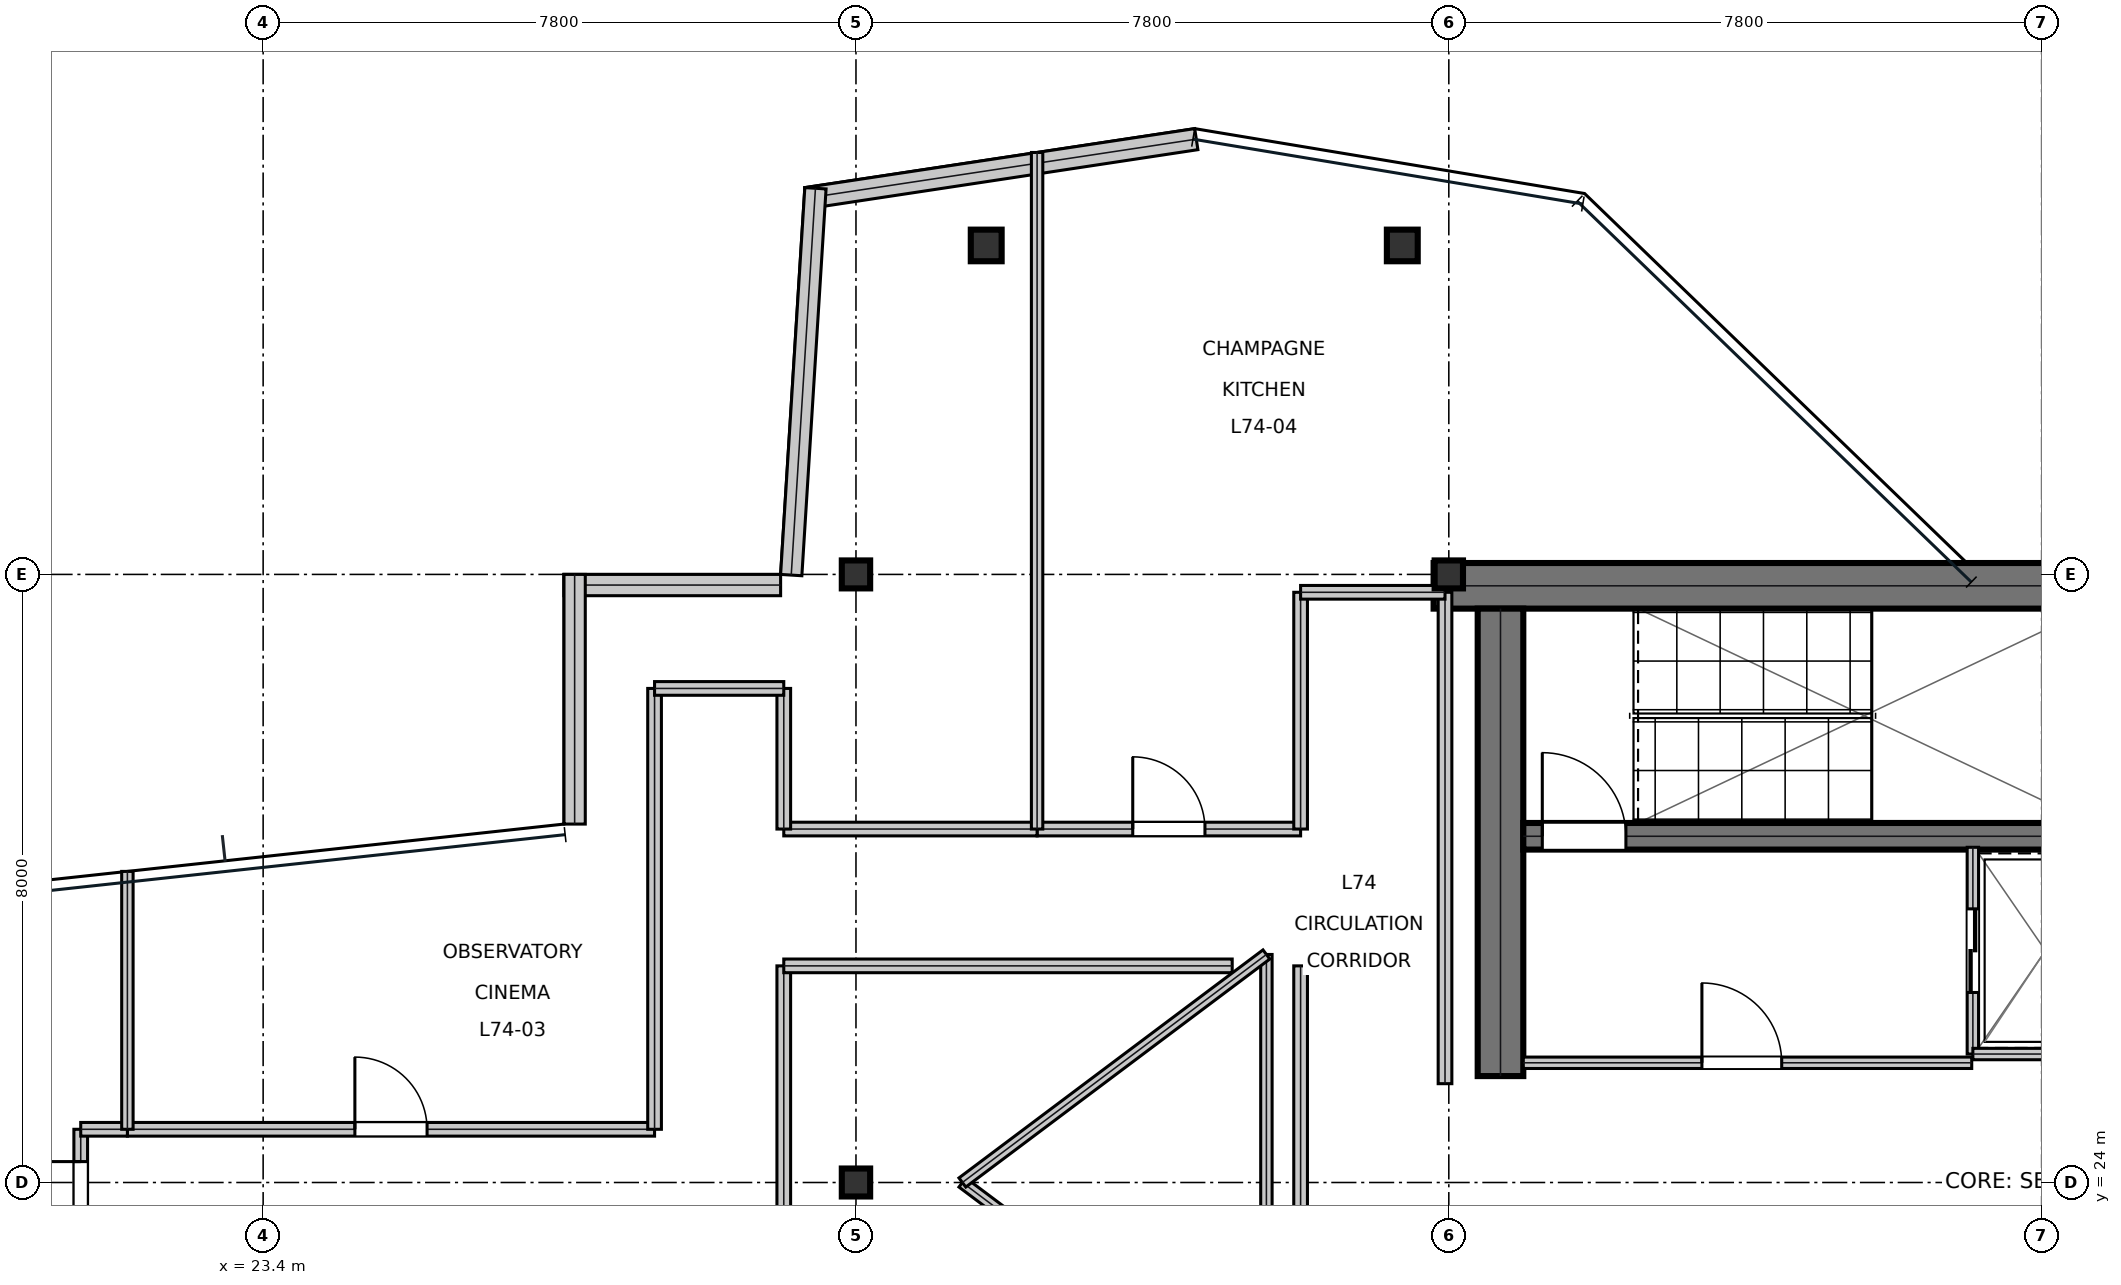
"""IFC4 building model, lengths in metres.
Left out: names, types, materials, properties, quantities, classifications, styles, units other than length and angle.
Written with IfcOpenShell. Run it as: python <this file> out.ifc"""

import sys

from ifc_helpers import new_model, si_unit, direction, frame, frame_2d, origin, origin_2d, place, context, subcontext, project, spatial, rectangle, i_section, extrude, element, fill, save


model = new_model("IFC4")
c1 = context("Model", 3, precision=1e-05, world=origin(), true_north=direction((0.0, 1.0)))
c2 = subcontext(c1, "Body", "Model", "MODEL_VIEW")
j1 = project(units=[si_unit("LENGTHUNIT", "METRE"), si_unit("PLANEANGLEUNIT", "RADIAN")], contexts=[c1])
p1 = place(None, origin())
s1 = spatial("IfcSite", under=j1, at=p1, CompositionType="ELEMENT")
p2 = place(p1, origin())
s2 = spatial("IfcBuilding", under=s1, at=p2, CompositionType="ELEMENT")
p3 = place(p2, frame((0.0, 0.0, 315.45)))
s3 = spatial("IfcBuildingStorey", under=s2, at=p3, CompositionType="ELEMENT", Elevation=315.45)
p4 = place(p3, frame((38.8, 31.85, 0.0), z_axis=(0.0, 0.0, 1.0), x_axis=(1.0, 0.0, 0.0)))
e1 = element("IfcWall", 1, at=p4, inside=s3, PredefinedType="SHEAR", context=c2, shape_type="SweptSolid", body=[
    extrude(rectangle(XDim=16.0, YDim=0.6, at=frame_2d((8.0, 0.0))), origin(), (0.0, 0.0, 1.0), 3.78),
])
p5 = place(p3, frame((39.68, 25.4, 0.0), z_axis=(0.0, 0.0, 1.0), x_axis=(0.0, 1.0, 0.0)))
e2 = element("IfcWall", 2, at=p5, inside=s3, PredefinedType="SHEAR", context=c2, shape_type="SweptSolid", body=[
    extrude(rectangle(XDim=6.15, YDim=0.6, at=frame_2d((3.075, 0.0))), origin(), (0.0, 0.0, 1.0), 3.78),
])
p6 = place(p3, frame((39.98, 28.555, 0.0), z_axis=(0.0, 0.0, 1.0), x_axis=(1.0, 0.0, 0.0)))
e3 = element("IfcWall", 3, at=p6, inside=s3, PredefinedType="SHEAR", context=c2, shape_type="SweptSolid", body=[
    extrude(rectangle(XDim=7.71, YDim=0.35, at=frame_2d((3.855, 0.0))), origin(), (0.0, 0.0, 1.0), 3.78),
])
p7 = place(p6, frame((0.25, 0.0, 0.0)))
e4 = element("IfcOpeningElement", 4, at=p7, cuts=e3, PredefinedType="OPENING", context=c2, shape_type="SweptSolid", body=[
    extrude(rectangle(XDim=1.1, YDim=2.15, at=frame_2d((0.55, 1.075))), frame((0.0, 0.185, 0.0), z_axis=(0.0, -1.0, 0.0), x_axis=(1.0, 0.0, 0.0)), (0.0, 0.0, 1.0), 0.37),
])
for number, where, z_axis, x_axis in (
    (5, (31.2, 24.0, 0.0), (0.0, 0.0, 1.0), (1.0, 0.0, 0.0)),
    (6, (31.2, 32.0, 0.0), (0.0, 0.0, 1.0), (1.0, 0.0, 0.0)),
    (7, (39.0, 32.0, 0.0), (0.0, 0.0, 1.0), (1.0, 0.0, 0.0)),
):
    element("IfcColumn", number, at=place(p3, frame(where, z_axis=z_axis, x_axis=x_axis)), inside=s3, PredefinedType="COLUMN", context=c2, shape_type="SweptSolid", body=[
        extrude(i_section(OverallWidth=0.373, OverallDepth=0.368, WebThickness=0.015, FlangeThickness=0.024, at=origin_2d()), origin(), (0.0, 0.0, 1.0), 4.044),
    ])
for number, where, z_axis, x_axis in (
    (8, (32.914, 36.328, 0.016), (0.0, 0.0, 1.0), (1.0, 0.0, 0.0)),
    (9, (38.388, 36.328, 0.016), (0.0, 0.0, 1.0), (1.0, 0.0, 0.0)),
):
    element("IfcColumn", number, at=place(p3, frame(where, z_axis=z_axis, x_axis=x_axis)), inside=s3, PredefinedType="COLUMN", context=c2, shape_type="SweptSolid", body=[
        extrude(i_section(OverallWidth=0.406, OverallDepth=0.416, WebThickness=0.03, FlangeThickness=0.048, at=origin_2d()), origin(), (0.0, 0.0, 1.0), 4.018),
    ])
p8 = place(p3, frame((35.678, 37.726, 0.0), z_axis=(0.0, 0.0, 1.0), x_axis=(-0.988753702072, -0.149553056265, 0.0)))
e10 = element("IfcWall", 10, at=p8, inside=s3, PredefinedType="STANDARD", context=c2, shape_type="SweptSolid", body=[
    extrude(rectangle(XDim=5.188, YDim=0.28, at=frame_2d((2.594, 0.0))), origin(), (0.0, 0.0, 1.0), 3.78),
])
p9 = place(p3, frame((30.667, 37.08, 0.0), z_axis=(0.0, 0.0, 1.0), x_axis=(-0.062485600391, -0.998045865551, 0.0)))
e11 = element("IfcWall", 11, at=p9, inside=s3, PredefinedType="STANDARD", context=c2, shape_type="SweptSolid", body=[
    extrude(rectangle(XDim=5.099, YDim=0.28, at=frame_2d((2.549, 0.0))), origin(), (0.0, 0.0, 1.0), 3.78),
])
p10 = place(p3, frame((30.208, 31.86, 0.0), z_axis=(0.0, 0.0, 1.0), x_axis=(-1.0, 0.0, 0.0)))
e12 = element("IfcWall", 12, at=p10, inside=s3, PredefinedType="STANDARD", context=c2, shape_type="SweptSolid", body=[
    extrude(rectangle(XDim=2.85, YDim=0.28, at=frame_2d((1.425, 0.0))), origin(), (0.0, 0.0, 1.0), 3.78),
])
p11 = place(p3, frame((27.498, 32.0, 0.0), z_axis=(0.0, 0.0, 1.0), x_axis=(0.0, -1.0, 0.0)))
e13 = element("IfcWall", 13, at=p11, inside=s3, PredefinedType="STANDARD", context=c2, shape_type="SweptSolid", body=[
    extrude(rectangle(XDim=3.284, YDim=0.28, at=frame_2d((1.642, 0.0))), origin(), (0.0, 0.0, 1.0), 3.309),
])
p12 = place(p3, frame((39.98, 25.575, 0.0), z_axis=(0.0, 0.0, 1.0), x_axis=(1.0, 0.0, 0.0)))
e14 = element("IfcWall", 14, at=p12, inside=s3, PredefinedType="PARTITIONING", context=c2, shape_type="SweptSolid", body=[
    extrude(rectangle(XDim=5.9, YDim=0.15, at=frame_2d((2.95, 0.0))), origin(), (0.0, 0.0, 1.0), 3.78),
])
p13 = place(p12, frame((2.35, 0.0, 0.0)))
e15 = element("IfcOpeningElement", 15, at=p13, cuts=e14, PredefinedType="OPENING", context=c2, shape_type="SweptSolid", body=[
    extrude(rectangle(XDim=1.05, YDim=2.15, at=frame_2d((0.525, 1.075))), frame((0.0, 0.085, 0.0), z_axis=(0.0, -1.0, 0.0), x_axis=(1.0, 0.0, 0.0)), (0.0, 0.0, 1.0), 0.17),
])
p14 = place(p3, frame((45.895, 25.69, 0.0), z_axis=(0.0, 0.0, 1.0), x_axis=(0.0, 1.0, 0.0)))
e16 = element("IfcWall", 16, at=p14, inside=s3, PredefinedType="PARTITIONING", context=c2, shape_type="SweptSolid", body=[
    extrude(rectangle(XDim=2.72, YDim=0.15, at=frame_2d((1.36, 0.0))), origin(), (0.0, 0.0, 1.0), 3.78),
])
p15 = place(p14, frame((0.81, 0.0, 0.0)))
e17 = element("IfcOpeningElement", 17, at=p15, cuts=e16, PredefinedType="OPENING", context=c2, shape_type="SweptSolid", body=[
    extrude(rectangle(XDim=1.1, YDim=2.15, at=frame_2d((0.55, 1.075))), frame((0.0, 0.085, 0.0), z_axis=(0.0, -1.0, 0.0), x_axis=(1.0, 0.0, 0.0)), (0.0, 0.0, 1.0), 0.17),
])
p16 = place(p3, frame((45.895, 25.69, 0.0), z_axis=(0.0, 0.0, 1.0), x_axis=(1.0, 0.0, 0.0)))
e18 = element("IfcWall", 18, at=p16, inside=s3, PredefinedType="PARTITIONING", context=c2, shape_type="SweptSolid", body=[
    extrude(rectangle(XDim=1.915, YDim=0.15, at=frame_2d((0.958, 0.0))), origin(), (0.0, 0.0, 1.0), 3.78),
])
p17 = place(p3, frame((37.05, 16.235, 0.0), z_axis=(0.0, 0.0, 1.0), x_axis=(0.0, 1.0, 0.0)))
e19 = element("IfcWall", 19, at=p17, inside=s3, PredefinedType="SOLIDWALL", context=c2, shape_type="SweptSolid", body=[
    extrude(rectangle(XDim=10.615, YDim=0.18, at=frame_2d((5.308, 0.0))), origin(), (0.0, 0.0, 1.0), 2.856),
])
p18 = place(p17, frame((2.852, 0.0, 0.0)))
e20 = element("IfcOpeningElement", 20, at=p18, cuts=e19, PredefinedType="OPENING", context=c2, shape_type="SweptSolid", body=[
    extrude(rectangle(XDim=0.95, YDim=2.15, at=frame_2d((0.475, 1.075))), frame((0.0, 0.1, 0.0), z_axis=(0.0, -1.0, 0.0), x_axis=(1.0, 0.0, 0.0)), (0.0, 0.0, 1.0), 0.2),
])
p19 = place(p3, frame((21.0, 22.9, 0.0), z_axis=(0.0, 0.0, 1.0), x_axis=(0.0, 1.0, 0.0)))
e21 = element("IfcWall", 21, at=p19, inside=s3, PredefinedType="SOLIDWALL", context=c2, shape_type="SweptSolid", body=[
    extrude(rectangle(XDim=1.8, YDim=0.18, at=frame_2d((0.9, 0.0))), origin(), (0.0, 0.0, 1.0), 3.78),
])
p20 = place(p19, frame((0.425, 0.0, 0.0)))
e22 = element("IfcOpeningElement", 22, at=p20, cuts=e21, PredefinedType="OPENING", context=c2, shape_type="SweptSolid", body=[
    extrude(rectangle(XDim=0.95, YDim=2.15, at=frame_2d((0.475, 1.075))), frame((0.0, 0.1, 0.0), z_axis=(0.0, -1.0, 0.0), x_axis=(1.0, 0.0, 0.0)), (0.0, 0.0, 1.0), 0.2),
])
p21 = place(p3, frame((21.614, 24.7, 0.0), z_axis=(0.0, 0.0, 1.0), x_axis=(1.0, 0.0, 0.0)))
e23 = element("IfcWall", 23, at=p21, inside=s3, PredefinedType="SOLIDWALL", context=c2, shape_type="SweptSolid", body=[
    extrude(rectangle(XDim=6.936, YDim=0.18, at=frame_2d((3.468, 0.0))), origin(), (0.0, 0.0, 1.0), 3.24),
])
p22 = place(p21, frame((2.993, 0.0, 0.0)))
e24 = element("IfcOpeningElement", 24, at=p22, cuts=e23, PredefinedType="OPENING", context=c2, shape_type="SweptSolid", body=[
    extrude(rectangle(XDim=0.95, YDim=2.15, at=frame_2d((0.475, 1.075))), frame((0.0, 0.1, 0.0), z_axis=(0.0, -1.0, 0.0), x_axis=(1.0, 0.0, 0.0)), (0.0, 0.0, 1.0), 0.2),
])
p23 = place(p3, frame((33.583, 28.65, 0.0), z_axis=(0.0, 0.0, 1.0), x_axis=(1.0, 0.0, 0.0)))
e25 = element("IfcWall", 25, at=p23, inside=s3, PredefinedType="SOLIDWALL", context=c2, shape_type="SweptSolid", body=[
    extrude(rectangle(XDim=3.467, YDim=0.18, at=frame_2d((1.733, 0.0))), origin(), (0.0, 0.0, 1.0), 3.78),
])
p24 = place(p23, frame((1.259, 0.0, 0.0)))
e26 = element("IfcOpeningElement", 26, at=p24, cuts=e25, PredefinedType="OPENING", context=c2, shape_type="SweptSolid", body=[
    extrude(rectangle(XDim=0.95, YDim=2.15, at=frame_2d((0.475, 1.075))), frame((0.0, 0.1, 0.0), z_axis=(0.0, -1.0, 0.0), x_axis=(1.0, 0.0, 0.0)), (0.0, 0.0, 1.0), 0.2),
])
p25 = place(p3, frame((30.25, 17.5, 0.0), z_axis=(0.0, 0.0, 1.0), x_axis=(0.0, 1.0, 0.0)))
e27 = element("IfcWall", 27, at=p25, inside=s3, PredefinedType="SOLIDWALL", context=c2, shape_type="SweptSolid", body=[
    extrude(rectangle(XDim=9.35, YDim=0.18, at=frame_2d((4.675, 0.0))), origin(), (0.0, 0.0, 1.0), 2.856),
])
p26 = place(p3, frame((30.25, 26.85, 0.0), z_axis=(0.0, 0.0, 1.0), x_axis=(1.0, 0.0, 0.0)))
e28 = element("IfcWall", 28, at=p26, inside=s3, PredefinedType="SOLIDWALL", context=c2, shape_type="SweptSolid", body=[
    extrude(rectangle(XDim=5.9, YDim=0.18, at=frame_2d((2.95, 0.0))), origin(), (0.0, 0.0, 1.0), 2.856),
])
p27 = place(p3, frame((21.0, 24.7, 0.0), z_axis=(0.0, 0.0, 1.0), x_axis=(1.0, 0.0, 0.0)))
e29 = element("IfcWall", 29, at=p27, inside=s3, PredefinedType="SOLIDWALL", context=c2, shape_type="SweptSolid", body=[
    extrude(rectangle(XDim=0.614, YDim=0.18, at=frame_2d((0.307, 0.0))), origin(), (0.0, 0.0, 1.0), 3.78),
])
p28 = place(p3, frame((28.55, 24.7, 0.0), z_axis=(0.0, 0.0, 1.0), x_axis=(0.0, 1.0, 0.0)))
e30 = element("IfcWall", 30, at=p28, inside=s3, PredefinedType="SOLIDWALL", context=c2, shape_type="SweptSolid", body=[
    extrude(rectangle(XDim=5.8, YDim=0.18, at=frame_2d((2.9, 0.0))), origin(), (0.0, 0.0, 1.0), 2.856),
])
p29 = place(p3, frame((30.25, 28.65, 0.0), z_axis=(0.0, 0.0, 1.0), x_axis=(1.0, 0.0, 0.0)))
e31 = element("IfcWall", 31, at=p29, inside=s3, PredefinedType="SOLIDWALL", context=c2, shape_type="SweptSolid", body=[
    extrude(rectangle(XDim=3.333, YDim=0.18, at=frame_2d((1.667, 0.0))), origin(), (0.0, 0.0, 1.0), 3.24),
])
p30 = place(p3, frame((30.25, 28.65, 0.0), z_axis=(0.0, 0.0, 1.0), x_axis=(0.0, 1.0, 0.0)))
e32 = element("IfcWall", 32, at=p30, inside=s3, PredefinedType="SOLIDWALL", context=c2, shape_type="SweptSolid", body=[
    extrude(rectangle(XDim=1.85, YDim=0.18, at=frame_2d((0.925, 0.0))), origin(), (0.0, 0.0, 1.0), 3.78),
])
p31 = place(p3, frame((28.55, 30.5, 0.0), z_axis=(0.0, 0.0, 1.0), x_axis=(1.0, 0.0, 0.0)))
e33 = element("IfcWall", 33, at=p31, inside=s3, PredefinedType="SOLIDWALL", context=c2, shape_type="SweptSolid", body=[
    extrude(rectangle(XDim=1.7, YDim=0.18, at=frame_2d((0.85, 0.0))), origin(), (0.0, 0.0, 1.0), 3.78),
])
p32 = place(p3, frame((38.95, 25.3, 0.0), z_axis=(0.0, 0.0, 1.0), x_axis=(0.0, 1.0, 0.0)))
e34 = element("IfcWall", 34, at=p32, inside=s3, PredefinedType="SOLIDWALL", context=c2, shape_type="SweptSolid", body=[
    extrude(rectangle(XDim=6.465, YDim=0.18, at=frame_2d((3.232, 0.0))), origin(), (0.0, 0.0, 1.0), 2.856),
])
p33 = place(p3, frame((37.05, 28.65, 0.0), z_axis=(0.0, 0.0, 1.0), x_axis=(0.0, 1.0, 0.0)))
e35 = element("IfcWall", 35, at=p33, inside=s3, PredefinedType="SOLIDWALL", context=c2, shape_type="SweptSolid", body=[
    extrude(rectangle(XDim=3.115, YDim=0.18, at=frame_2d((1.558, 0.0))), origin(), (0.0, 0.0, 1.0), 3.51),
])
p34 = place(p3, frame((37.05, 31.765, 0.0), z_axis=(0.0, 0.0, 1.0), x_axis=(1.0, 0.0, 0.0)))
e36 = element("IfcWall", 36, at=p34, inside=s3, PredefinedType="SOLIDWALL", context=c2, shape_type="SweptSolid", body=[
    extrude(rectangle(XDim=1.9, YDim=0.18, at=frame_2d((0.95, 0.0))), origin(), (0.0, 0.0, 1.0), 3.24),
])
p35 = place(p3, frame((21.614, 24.7, 0.0), z_axis=(0.0, 0.0, 1.0), x_axis=(0.0, 1.0, 0.0)))
e37 = element("IfcWall", 37, at=p35, inside=s3, PredefinedType="MOVABLE", context=c2, shape_type="SweptSolid", body=[
    extrude(rectangle(XDim=3.393, YDim=0.15, at=frame_2d((1.696, 0.0))), origin(), (0.0, 0.0, 1.0), 2.856),
])
p36 = place(p3, frame((33.583, 28.65, 0.0), z_axis=(0.0, 0.0, 1.0), x_axis=(0.0, 1.0, 0.0)))
e38 = element("IfcWall", 38, at=p36, inside=s3, PredefinedType="MOVABLE", context=c2, shape_type="SweptSolid", body=[
    extrude(rectangle(XDim=8.901, YDim=0.15, at=frame_2d((4.451, 0.0))), origin(), (0.0, 0.0, 1.0), 3.24),
])
p37 = place(p3, frame((32.6, 24.0, 0.0), z_axis=(0.0, 0.0, 1.0), x_axis=(0.8, -0.6, 0.0)))
e39 = element("IfcWall", 39, at=p37, inside=s3, PredefinedType="MOVABLE", context=c2, shape_type="SweptSolid", body=[
    extrude(rectangle(XDim=5.0, YDim=0.15, at=frame_2d((2.5, 0.0))), origin(), (0.0, 0.0, 1.0), 2.856),
])
p38 = place(p3, frame((36.6, 21.0, 0.0), z_axis=(0.0, 0.0, 1.0), x_axis=(0.0, 1.0, 0.0)))
e40 = element("IfcWall", 40, at=p38, inside=s3, PredefinedType="MOVABLE", context=c2, shape_type="SweptSolid", body=[
    extrude(rectangle(XDim=6.0, YDim=0.15, at=frame_2d((3.0, 0.0))), origin(), (0.0, 0.0, 1.0), 2.856),
])
p39 = place(p3, frame((36.6, 27.0, 0.0), z_axis=(0.0, 0.0, 1.0), x_axis=(-0.8, -0.6, 0.0)))
e41 = element("IfcWall", 41, at=p39, inside=s3, PredefinedType="MOVABLE", context=c2, shape_type="SweptSolid", body=[
    extrude(rectangle(XDim=5.0, YDim=0.15, at=frame_2d((2.5, 0.0))), origin(), (0.0, 0.0, 1.0), 2.856),
])
p40 = place(p13, origin())
e42 = element("IfcDoor", 42, at=p40, inside=s3, OperationType="SINGLE_SWING_LEFT", PredefinedType="DOOR", context=c2, shape_type="SweptSolid", body=[
    extrude(rectangle(XDim=1.05, YDim=2.15, at=frame_2d((0.525, 1.075))), frame((0.0, 0.025, 0.0), z_axis=(0.0, -1.0, 0.0), x_axis=(1.0, 0.0, 0.0)), (0.0, 0.0, 1.0), 0.05),
])
fill(e15, e42)
p41 = place(p15, frame((1.1, 0.0, 0.0), z_axis=(0.0, 0.0, 1.0), x_axis=(-1.0, 0.0, 0.0)))
e43 = element("IfcDoor", 43, at=p41, inside=s3, OperationType="DOUBLE_DOOR_SLIDING", PredefinedType="DOOR", context=c2, shape_type="SweptSolid", body=[
    extrude(rectangle(XDim=1.1, YDim=2.15, at=frame_2d((0.55, 1.075))), frame((0.0, 0.025, 0.0), z_axis=(0.0, -1.0, 0.0), x_axis=(1.0, 0.0, 0.0)), (0.0, 0.0, 1.0), 0.05),
])
fill(e17, e43)
p42 = place(p20, origin())
e44 = element("IfcDoor", 44, at=p42, inside=s3, OperationType="SINGLE_SWING_RIGHT", PredefinedType="DOOR", context=c2, shape_type="SweptSolid", body=[
    extrude(rectangle(XDim=0.95, YDim=2.15, at=frame_2d((0.475, 1.075))), frame((0.0, 0.025, 0.0), z_axis=(0.0, -1.0, 0.0), x_axis=(1.0, 0.0, 0.0)), (0.0, 0.0, 1.0), 0.05),
])
fill(e22, e44)
p43 = place(p22, origin())
e45 = element("IfcDoor", 45, at=p43, inside=s3, OperationType="SINGLE_SWING_LEFT", PredefinedType="DOOR", context=c2, shape_type="SweptSolid", body=[
    extrude(rectangle(XDim=0.95, YDim=2.15, at=frame_2d((0.475, 1.075))), frame((0.0, 0.025, 0.0), z_axis=(0.0, -1.0, 0.0), x_axis=(1.0, 0.0, 0.0)), (0.0, 0.0, 1.0), 0.05),
])
fill(e24, e45)
p44 = place(p24, origin())
e46 = element("IfcDoor", 46, at=p44, inside=s3, OperationType="SINGLE_SWING_LEFT", PredefinedType="DOOR", context=c2, shape_type="SweptSolid", body=[
    extrude(rectangle(XDim=0.95, YDim=2.15, at=frame_2d((0.475, 1.075))), frame((0.0, 0.025, 0.0), z_axis=(0.0, -1.0, 0.0), x_axis=(1.0, 0.0, 0.0)), (0.0, 0.0, 1.0), 0.05),
])
fill(e26, e46)
p45 = place(p7, origin())
e47 = element("IfcDoor", 47, at=p45, inside=s3, OperationType="SINGLE_SWING_LEFT", PredefinedType="DOOR", context=c2, shape_type="SweptSolid", body=[
    extrude(rectangle(XDim=1.1, YDim=2.15, at=frame_2d((0.55, 1.075))), frame((0.0, 0.025, 0.0), z_axis=(0.0, -1.0, 0.0), x_axis=(1.0, 0.0, 0.0)), (0.0, 0.0, 1.0), 0.05),
])
fill(e4, e47)
save(model, sys.argv[1])
